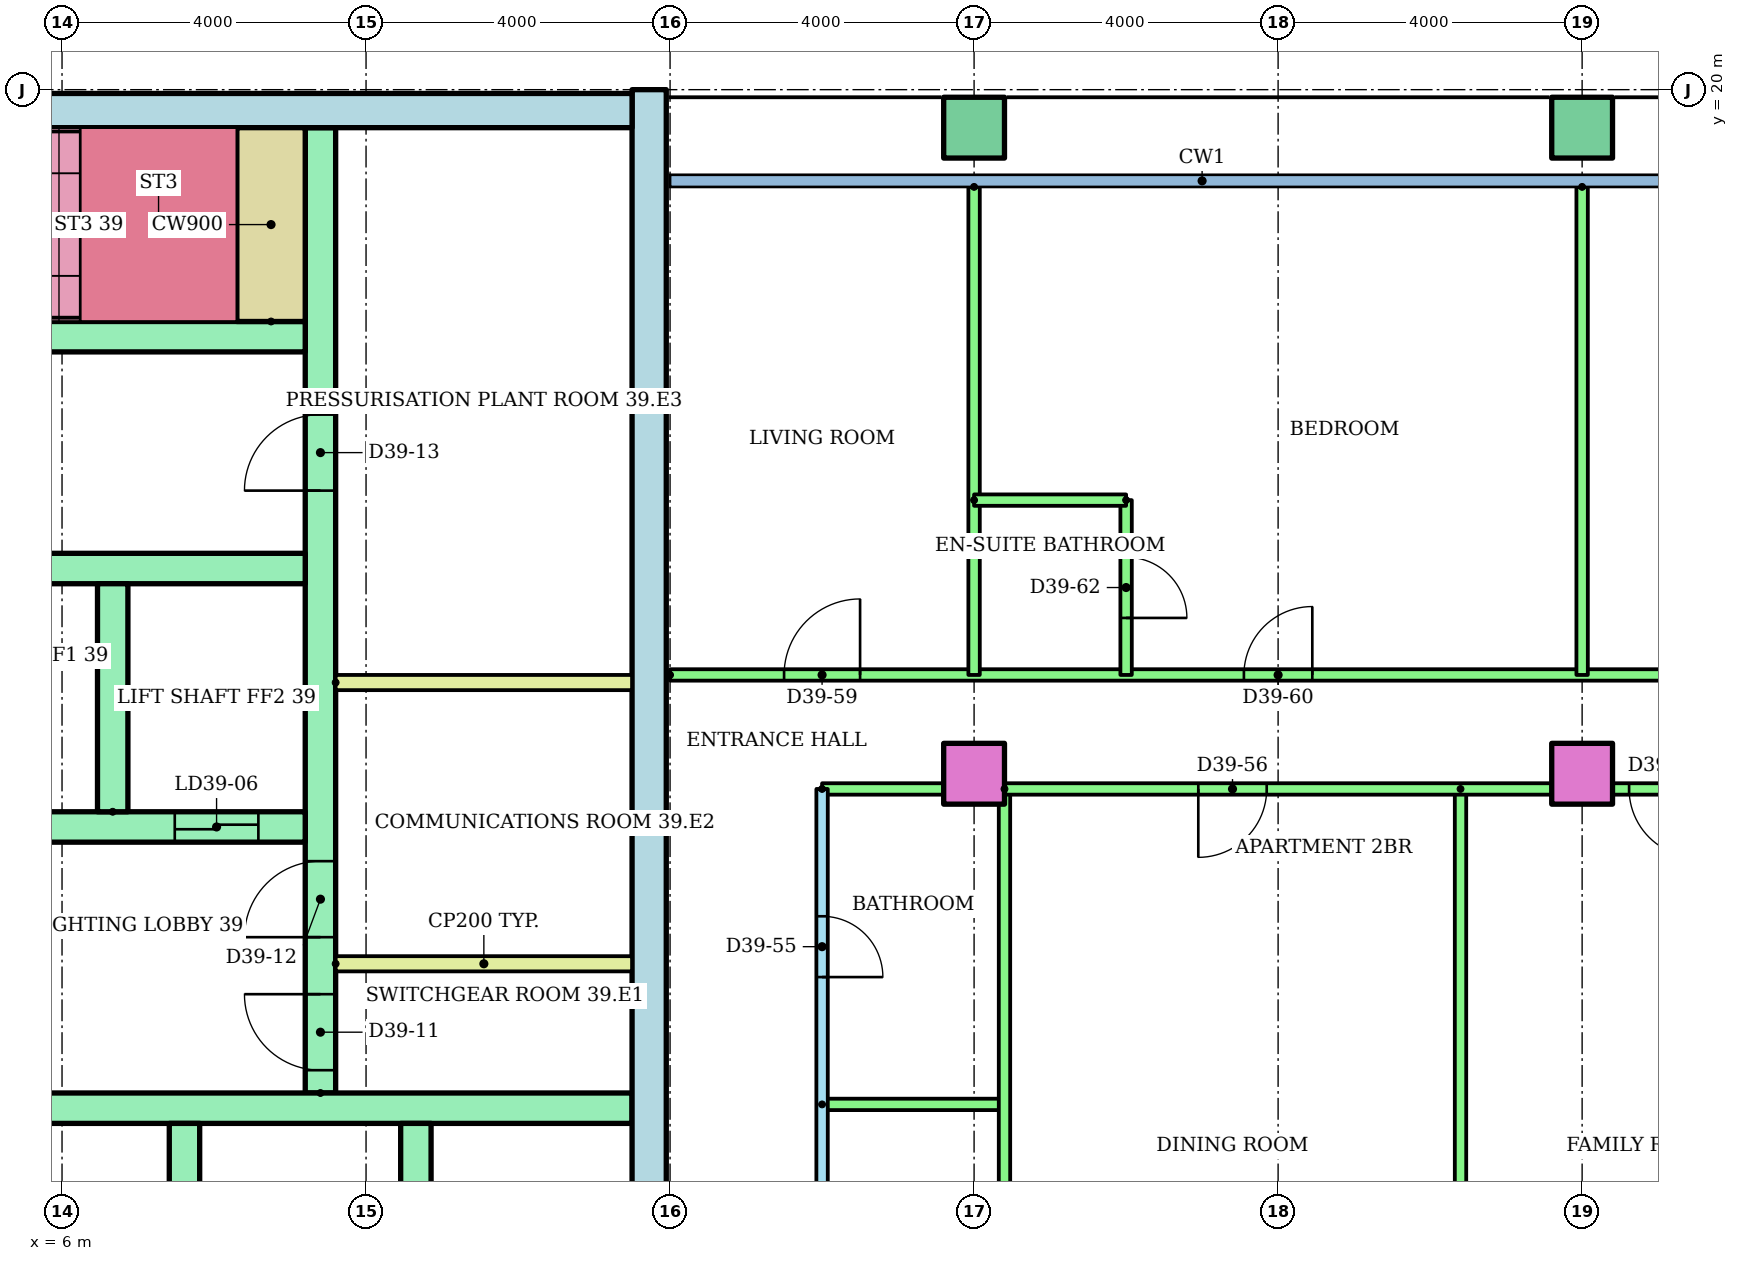
"""IFC4 building model, lengths in metres.
Left out: names, types, materials, properties, quantities, classifications, styles, units other than length and angle.
Written with IfcOpenShell. Run it as: python <this file> out.ifc"""

import sys

from ifc_helpers import new_model, si_unit, direction, frame, frame_2d, origin, origin_2d, place, context, subcontext, project, spatial, rectangle, hollow_rectangle, extrude, element, fill, save


model = new_model("IFC4")
c1 = context("Model", 3, precision=1e-05, world=origin(), true_north=direction((0.0, 1.0)))
c2 = subcontext(c1, "Body", "Model", "MODEL_VIEW")
j1 = project(units=[si_unit("LENGTHUNIT", "METRE"), si_unit("PLANEANGLEUNIT", "RADIAN")], contexts=[c1])
p1 = place(None, origin())
s1 = spatial("IfcSite", under=j1, at=p1, CompositionType="ELEMENT")
p2 = place(p1, origin())
s2 = spatial("IfcBuilding", under=s1, at=p2, CompositionType="ELEMENT")
p3 = place(p2, frame((0.0, 0.0, 148.6)))
s3 = spatial("IfcBuildingStorey", under=s2, at=p3, CompositionType="ELEMENT", Elevation=148.6)
for number, where in (
    (1, (18.0, 11.0, 0.0)),
    (2, (26.0, 11.0, 0.0)),
):
    element("IfcColumn", number, at=place(p3, frame(where)), inside=s3, PredefinedType="COLUMN", context=c2, shape_type="SweptSolid", body=[
        extrude(rectangle(XDim=0.8, YDim=0.8, at=origin_2d()), origin(), (0.0, 0.0, 1.0), 3.2),
    ])
for number, where in (
    (3, (18.0, 19.5, 0.0)),
    (4, (26.0, 19.5, 0.0)),
):
    element("IfcColumn", number, at=place(p3, frame(where)), inside=s3, PredefinedType="COLUMN", context=c2, shape_type="SweptSolid", body=[
        extrude(hollow_rectangle(XDim=0.8, YDim=0.8, WallThickness=0.04, at=origin_2d()), origin(), (0.0, 0.0, 1.0), 3.2),
    ])
p4 = place(p3, frame((13.725, 3.0, 0.0), z_axis=(0.0, 0.0, 1.0), x_axis=(0.0, 1.0, 0.0)))
e5 = element("IfcWall", 5, at=p4, inside=s3, PredefinedType="SHEAR", context=c2, shape_type="SweptSolid", body=[
    extrude(rectangle(XDim=17.0, YDim=0.45, at=frame_2d((8.5, 0.0))), origin(), (0.0, 0.0, 1.0), 2.8),
])
p5 = place(p3, frame((-13.5, 19.725, 0.0)))
e6 = element("IfcWall", 6, at=p5, inside=s3, PredefinedType="SHEAR", context=c2, shape_type="SweptSolid", body=[
    extrude(rectangle(XDim=27.0, YDim=0.45, at=frame_2d((13.5, 0.0))), origin(), (0.0, 0.0, 1.0), 2.8),
])
p6 = place(p3, frame((9.4, 6.8, 0.0), z_axis=(0.0, 0.0, 1.0), x_axis=(0.0, 1.0, 0.0)))
e7 = element("IfcWall", 7, at=p6, inside=s3, PredefinedType="SHEAR", context=c2, shape_type="SweptSolid", body=[
    extrude(rectangle(XDim=12.7, YDim=0.4, at=frame_2d((6.35, 0.0))), origin(), (0.0, 0.0, 1.0), 2.8),
])
p7 = place(p6, frame((0.3, 0.0, 0.0)))
e8 = element("IfcOpeningElement", 8, at=p7, cuts=e7, PredefinedType="OPENING", context=c2, shape_type="SweptSolid", body=[
    extrude(rectangle(XDim=1.0, YDim=2.1, at=frame_2d((0.5, 1.05))), frame((0.0, 0.21, 0.0), z_axis=(0.0, -1.0, 0.0), x_axis=(1.0, 0.0, 0.0)), (0.0, 0.0, 1.0), 0.42),
])
p8 = place(p6, frame((2.05, 0.0, 0.0)))
e9 = element("IfcOpeningElement", 9, at=p8, cuts=e7, PredefinedType="OPENING", context=c2, shape_type="SweptSolid", body=[
    extrude(rectangle(XDim=1.0, YDim=2.1, at=frame_2d((0.5, 1.05))), frame((0.0, 0.21, 0.0), z_axis=(0.0, -1.0, 0.0), x_axis=(1.0, 0.0, 0.0)), (0.0, 0.0, 1.0), 0.42),
])
p9 = place(p6, frame((7.925, 0.0, 0.0)))
e10 = element("IfcOpeningElement", 10, at=p9, cuts=e7, PredefinedType="OPENING", context=c2, shape_type="SweptSolid", body=[
    extrude(rectangle(XDim=1.0, YDim=2.1, at=frame_2d((0.5, 1.05))), frame((0.0, 0.21, 0.0), z_axis=(0.0, -1.0, 0.0), x_axis=(1.0, 0.0, 0.0)), (0.0, 0.0, 1.0), 0.42),
])
p10 = place(p3, frame((1.522, 6.6, 0.0)))
e11 = element("IfcWall", 11, at=p10, inside=s3, PredefinedType="SHEAR", context=c2, shape_type="SweptSolid", body=[
    extrude(rectangle(XDim=11.978, YDim=0.4, at=frame_2d((5.989, 0.0))), origin(), (0.0, 0.0, 1.0), 2.8),
])
for number, where, z_axis, x_axis in (
    (12, (7.611, 3.4, 0.0), (0.0, 0.0, 1.0), (0.0, 1.0, 0.0)),
    (13, (10.656, 3.4, 0.0), (0.0, 0.0, 1.0), (0.0, 1.0, 0.0)),
):
    element("IfcWall", number, at=place(p3, frame(where, z_axis=z_axis, x_axis=x_axis)), inside=s3, PredefinedType="SHEAR", context=c2, shape_type="SweptSolid", body=[
        extrude(rectangle(XDim=3.0, YDim=0.4, at=frame_2d((1.5, 0.0))), origin(), (0.0, 0.0, 1.0), 2.8),
    ])
p11 = place(p3, frame((1.2, 10.3, 0.0)))
e14 = element("IfcWall", 14, at=p11, inside=s3, PredefinedType="SHEAR", context=c2, shape_type="SweptSolid", body=[
    extrude(rectangle(XDim=8.0, YDim=0.4, at=frame_2d((4.0, 0.0))), origin(), (0.0, 0.0, 1.0), 2.8),
])
p12 = place(p11, frame((3.55, 0.0, 0.0)))
e15 = element("IfcOpeningElement", 15, at=p12, cuts=e14, PredefinedType="OPENING", context=c2, shape_type="SweptSolid", body=[
    extrude(rectangle(XDim=1.1, YDim=2.1, at=frame_2d((0.55, 1.05))), frame((0.0, 0.21, 0.0), z_axis=(0.0, -1.0, 0.0), x_axis=(1.0, 0.0, 0.0)), (0.0, 0.0, 1.0), 0.42),
])
p13 = place(p11, frame((6.283, 0.0, 0.0)))
e16 = element("IfcOpeningElement", 16, at=p13, cuts=e14, PredefinedType="OPENING", context=c2, shape_type="SweptSolid", body=[
    extrude(rectangle(XDim=1.1, YDim=2.1, at=frame_2d((0.55, 1.05))), frame((0.0, 0.21, 0.0), z_axis=(0.0, -1.0, 0.0), x_axis=(1.0, 0.0, 0.0)), (0.0, 0.0, 1.0), 0.42),
])
p14 = place(p11, frame((0.867, 0.0, 0.0)))
e17 = element("IfcOpeningElement", 17, at=p14, cuts=e14, PredefinedType="OPENING", context=c2, shape_type="SweptSolid", body=[
    extrude(rectangle(XDim=1.0, YDim=2.1, at=frame_2d((0.5, 1.05))), frame((0.0, 0.21, 0.0), z_axis=(0.0, -1.0, 0.0), x_axis=(1.0, 0.0, 0.0)), (0.0, 0.0, 1.0), 0.42),
])
p15 = place(p3, frame((1.2, 13.7, 0.0)))
e18 = element("IfcWall", 18, at=p15, inside=s3, PredefinedType="SHEAR", context=c2, shape_type="SweptSolid", body=[
    extrude(rectangle(XDim=8.0, YDim=0.4, at=frame_2d((4.0, 0.0))), origin(), (0.0, 0.0, 1.0), 2.8),
])
p16 = place(p3, frame((6.667, 10.5, 0.0), z_axis=(0.0, 0.0, 1.0), x_axis=(0.0, 1.0, 0.0)))
e19 = element("IfcWall", 19, at=p16, inside=s3, PredefinedType="SHEAR", context=c2, shape_type="SweptSolid", body=[
    extrude(rectangle(XDim=3.0, YDim=0.4, at=frame_2d((1.5, 0.0))), origin(), (0.0, 0.0, 1.0), 2.8),
])
p17 = place(p3, frame((-9.2, 16.75, 0.0)))
e20 = element("IfcWall", 20, at=p17, inside=s3, PredefinedType="SHEAR", context=c2, shape_type="SweptSolid", body=[
    extrude(rectangle(XDim=18.4, YDim=0.4, at=frame_2d((9.2, 0.0))), origin(), (0.0, 0.0, 1.0), 2.8),
])
p18 = place(p17, frame((0.1, 0.0, 0.0)))
e21 = element("IfcOpeningElement", 21, at=p18, cuts=e20, PredefinedType="OPENING", context=c2, shape_type="SweptSolid", body=[
    extrude(rectangle(XDim=0.95, YDim=2.1, at=frame_2d((0.475, 1.05))), frame((0.0, 0.21, 0.0), z_axis=(0.0, -1.0, 0.0), x_axis=(1.0, 0.0, 0.0)), (0.0, 0.0, 1.0), 0.42),
])
p19 = place(p17, frame((6.1, 0.0, 0.0)))
e22 = element("IfcOpeningElement", 22, at=p19, cuts=e20, PredefinedType="OPENING", context=c2, shape_type="SweptSolid", body=[
    extrude(rectangle(XDim=0.95, YDim=2.1, at=frame_2d((0.475, 1.05))), frame((0.0, 0.21, 0.0), z_axis=(0.0, -1.0, 0.0), x_axis=(1.0, 0.0, 0.0)), (0.0, 0.0, 1.0), 0.42),
])
p20 = place(p17, frame((12.1, 0.0, 0.0)))
e23 = element("IfcOpeningElement", 23, at=p20, cuts=e20, PredefinedType="OPENING", context=c2, shape_type="SweptSolid", body=[
    extrude(rectangle(XDim=0.95, YDim=2.1, at=frame_2d((0.475, 1.05))), frame((0.0, 0.21, 0.0), z_axis=(0.0, -1.0, 0.0), x_axis=(1.0, 0.0, 0.0)), (0.0, 0.0, 1.0), 0.42),
])
p21 = place(p3, frame((8.75, 16.95, 0.0), z_axis=(0.0, 0.0, 1.0), x_axis=(0.0, 1.0, 0.0)))
e24 = element("IfcWall", 24, at=p21, inside=s3, PredefinedType="SHEAR", context=c2, shape_type="SweptSolid", body=[
    extrude(rectangle(XDim=2.55, YDim=0.9, at=frame_2d((1.275, 0.0))), origin(), (0.0, 0.0, 1.0), 2.8),
])
for number, where in (
    (25, (9.6, 8.5, 0.0)),
    (26, (9.6, 12.2, 0.0)),
):
    element("IfcWall", number, at=place(p3, frame(where)), inside=s3, PredefinedType="PARTITIONING", context=c2, shape_type="SweptSolid", body=[
        extrude(rectangle(XDim=3.9, YDim=0.2, at=frame_2d((1.95, 0.0))), origin(), (0.0, 0.0, 1.0), 2.8),
    ])
p22 = place(p3, frame((16.0, 10.8, 0.0), z_axis=(0.0, 0.0, 1.0), x_axis=(0.0, -1.0, 0.0)))
e27 = element("IfcWall", 27, at=p22, inside=s3, PredefinedType="PARTITIONING", context=c2, shape_type="SweptSolid", body=[
    extrude(rectangle(XDim=9.4, YDim=0.15, at=frame_2d((4.7, 0.0))), origin(), (0.0, 0.0, 1.0), 2.4),
])
p23 = place(p22, frame((6.325, 0.0, 0.0)))
e28 = element("IfcOpeningElement", 28, at=p23, cuts=e27, PredefinedType="OPENING", context=c2, shape_type="SweptSolid", body=[
    extrude(rectangle(XDim=0.9, YDim=2.1, at=frame_2d((0.45, 1.05))), frame((0.0, 0.085, 0.0), z_axis=(0.0, -1.0, 0.0), x_axis=(1.0, 0.0, 0.0)), (0.0, 0.0, 1.0), 0.17),
])
p24 = place(p22, frame((1.675, 0.0, 0.0)))
e29 = element("IfcOpeningElement", 29, at=p24, cuts=e27, PredefinedType="OPENING", context=c2, shape_type="SweptSolid", body=[
    extrude(rectangle(XDim=0.8, YDim=2.1, at=frame_2d((0.4, 1.05))), frame((0.0, 0.085, 0.0), z_axis=(0.0, -1.0, 0.0), x_axis=(1.0, 0.0, 0.0)), (0.0, 0.0, 1.0), 0.17),
])
p25 = place(p3, frame((16.0, 6.65, 0.0)))
e30 = element("IfcWall", 30, at=p25, inside=s3, PredefinedType="PARTITIONING", context=c2, shape_type="SweptSolid", body=[
    extrude(rectangle(XDim=2.4, YDim=0.15, at=frame_2d((1.2, 0.0))), origin(), (0.0, 0.0, 1.0), 2.4),
])
for number, where, z_axis, x_axis in (
    (31, (18.4, 10.8, 0.0), (0.0, 0.0, 1.0), (0.0, -1.0, 0.0)),
    (32, (24.4, 10.8, 0.0), (0.0, 0.0, 1.0), (0.0, -1.0, 0.0)),
):
    element("IfcWall", number, at=place(p3, frame(where, z_axis=z_axis, x_axis=x_axis)), inside=s3, PredefinedType="PARTITIONING", context=c2, shape_type="SweptSolid", body=[
        extrude(rectangle(XDim=9.4, YDim=0.15, at=frame_2d((4.7, 0.0))), origin(), (0.0, 0.0, 1.0), 2.4),
    ])
p26 = place(p3, frame((32.71, 10.8, 0.0), z_axis=(0.0, 0.0, 1.0), x_axis=(-1.0, 0.0, 0.0)))
e33 = element("IfcWall", 33, at=p26, inside=s3, PredefinedType="PARTITIONING", context=c2, shape_type="SweptSolid", body=[
    extrude(rectangle(XDim=16.71, YDim=0.15, at=frame_2d((8.355, 0.0))), origin(), (0.0, 0.0, 1.0), 2.4),
])
p27 = place(p26, frame((10.86, 0.0, 0.0)))
e34 = element("IfcOpeningElement", 34, at=p27, cuts=e33, PredefinedType="OPENING", context=c2, shape_type="SweptSolid", body=[
    extrude(rectangle(XDim=0.9, YDim=2.1, at=frame_2d((0.45, 1.05))), frame((0.0, 0.085, 0.0), z_axis=(0.0, -1.0, 0.0), x_axis=(1.0, 0.0, 0.0)), (0.0, 0.0, 1.0), 0.17),
])
p28 = place(p26, frame((5.192, 0.0, 0.0)))
e35 = element("IfcOpeningElement", 35, at=p28, cuts=e33, PredefinedType="OPENING", context=c2, shape_type="SweptSolid", body=[
    extrude(rectangle(XDim=0.9, YDim=2.1, at=frame_2d((0.45, 1.05))), frame((0.0, 0.085, 0.0), z_axis=(0.0, -1.0, 0.0), x_axis=(1.0, 0.0, 0.0)), (0.0, 0.0, 1.0), 0.17),
])
p29 = place(p26, frame((1.435, 0.0, 0.0)))
e36 = element("IfcOpeningElement", 36, at=p29, cuts=e33, PredefinedType="OPENING", context=c2, shape_type="SweptSolid", body=[
    extrude(rectangle(XDim=0.9, YDim=2.1, at=frame_2d((0.45, 1.05))), frame((0.0, 0.085, 0.0), z_axis=(0.0, -1.0, 0.0), x_axis=(1.0, 0.0, 0.0)), (0.0, 0.0, 1.0), 0.17),
])
p30 = place(p3, frame((14.0, 12.3, 0.0)))
e37 = element("IfcWall", 37, at=p30, inside=s3, PredefinedType="PARTITIONING", context=c2, shape_type="SweptSolid", body=[
    extrude(rectangle(XDim=18.72, YDim=0.15, at=frame_2d((9.36, 0.0))), origin(), (0.0, 0.0, 1.0), 2.4),
])
p31 = place(p30, frame((1.5, 0.0, 0.0)))
e38 = element("IfcOpeningElement", 38, at=p31, cuts=e37, PredefinedType="OPENING", context=c2, shape_type="SweptSolid", body=[
    extrude(rectangle(XDim=1.0, YDim=2.1, at=frame_2d((0.5, 1.05))), frame((0.0, 0.085, 0.0), z_axis=(0.0, -1.0, 0.0), x_axis=(1.0, 0.0, 0.0)), (0.0, 0.0, 1.0), 0.17),
])
p32 = place(p30, frame((7.55, 0.0, 0.0)))
e39 = element("IfcOpeningElement", 39, at=p32, cuts=e37, PredefinedType="OPENING", context=c2, shape_type="SweptSolid", body=[
    extrude(rectangle(XDim=0.9, YDim=2.1, at=frame_2d((0.45, 1.05))), frame((0.0, 0.085, 0.0), z_axis=(0.0, -1.0, 0.0), x_axis=(1.0, 0.0, 0.0)), (0.0, 0.0, 1.0), 0.17),
])
p33 = place(p30, frame((14.8, 0.0, 0.0)))
e40 = element("IfcOpeningElement", 40, at=p33, cuts=e37, PredefinedType="OPENING", context=c2, shape_type="SweptSolid", body=[
    extrude(rectangle(XDim=0.9, YDim=2.1, at=frame_2d((0.45, 1.05))), frame((0.0, 0.085, 0.0), z_axis=(0.0, -1.0, 0.0), x_axis=(1.0, 0.0, 0.0)), (0.0, 0.0, 1.0), 0.17),
])
for number, where, z_axis, x_axis in (
    (41, (18.0, 18.721, 0.0), (0.0, 0.0, 1.0), (0.0, -1.0, 0.0)),
    (42, (26.0, 18.721, 0.0), (0.0, 0.0, 1.0), (0.0, -1.0, 0.0)),
):
    element("IfcWall", number, at=place(p3, frame(where, z_axis=z_axis, x_axis=x_axis)), inside=s3, PredefinedType="PARTITIONING", context=c2, shape_type="SweptSolid", body=[
        extrude(rectangle(XDim=6.421, YDim=0.15, at=frame_2d((3.21, 0.0))), origin(), (0.0, 0.0, 1.0), 2.4),
    ])
p34 = place(p3, frame((20.0, 14.6, 0.0), z_axis=(0.0, 0.0, 1.0), x_axis=(0.0, -1.0, 0.0)))
e43 = element("IfcWall", 43, at=p34, inside=s3, PredefinedType="PARTITIONING", context=c2, shape_type="SweptSolid", body=[
    extrude(rectangle(XDim=2.3, YDim=0.15, at=frame_2d((1.15, 0.0))), origin(), (0.0, 0.0, 1.0), 2.4),
])
p35 = place(p34, frame((0.75, 0.0, 0.0)))
e44 = element("IfcOpeningElement", 44, at=p35, cuts=e43, PredefinedType="OPENING", context=c2, shape_type="SweptSolid", body=[
    extrude(rectangle(XDim=0.8, YDim=2.1, at=frame_2d((0.4, 1.05))), frame((0.0, 0.085, 0.0), z_axis=(0.0, -1.0, 0.0), x_axis=(1.0, 0.0, 0.0)), (0.0, 0.0, 1.0), 0.17),
])
p36 = place(p3, frame((18.0, 14.6, 0.0)))
e45 = element("IfcWall", 45, at=p36, inside=s3, PredefinedType="PARTITIONING", context=c2, shape_type="SweptSolid", body=[
    extrude(rectangle(XDim=2.0, YDim=0.15, at=frame_2d((1.0, 0.0))), origin(), (0.0, 0.0, 1.0), 2.4),
])
p37 = place(p13, origin())
e46 = element("IfcDoor", 46, at=p37, inside=s3, OperationType="SLIDING_TO_LEFT", PredefinedType="DOOR", context=c2, shape_type="SweptSolid", body=[
    extrude(rectangle(XDim=1.1, YDim=2.1, at=frame_2d((0.55, 1.05))), frame((0.0, 0.025, 0.0), z_axis=(0.0, -1.0, 0.0), x_axis=(1.0, 0.0, 0.0)), (0.0, 0.0, 1.0), 0.05),
])
fill(e16, e46)
p38 = place(p7, origin())
e47 = element("IfcDoor", 47, at=p38, inside=s3, OperationType="SINGLE_SWING_RIGHT", PredefinedType="DOOR", context=c2, shape_type="SweptSolid", body=[
    extrude(rectangle(XDim=1.0, YDim=2.1, at=frame_2d((0.5, 1.05))), frame((0.0, 0.025, 0.0), z_axis=(0.0, -1.0, 0.0), x_axis=(1.0, 0.0, 0.0)), (0.0, 0.0, 1.0), 0.05),
])
fill(e8, e47)
p39 = place(p8, origin())
e48 = element("IfcDoor", 48, at=p39, inside=s3, OperationType="SINGLE_SWING_LEFT", PredefinedType="DOOR", context=c2, shape_type="SweptSolid", body=[
    extrude(rectangle(XDim=1.0, YDim=2.1, at=frame_2d((0.5, 1.05))), frame((0.0, 0.025, 0.0), z_axis=(0.0, -1.0, 0.0), x_axis=(1.0, 0.0, 0.0)), (0.0, 0.0, 1.0), 0.05),
])
fill(e9, e48)
p40 = place(p9, origin())
e49 = element("IfcDoor", 49, at=p40, inside=s3, OperationType="SINGLE_SWING_LEFT", PredefinedType="DOOR", context=c2, shape_type="SweptSolid", body=[
    extrude(rectangle(XDim=1.0, YDim=2.1, at=frame_2d((0.5, 1.05))), frame((0.0, 0.025, 0.0), z_axis=(0.0, -1.0, 0.0), x_axis=(1.0, 0.0, 0.0)), (0.0, 0.0, 1.0), 0.05),
])
fill(e10, e49)
p41 = place(p24, origin())
e50 = element("IfcDoor", 50, at=p41, inside=s3, OperationType="SINGLE_SWING_RIGHT", PredefinedType="DOOR", context=c2, shape_type="SweptSolid", body=[
    extrude(rectangle(XDim=0.8, YDim=2.1, at=frame_2d((0.4, 1.05))), frame((0.0, 0.025, 0.0), z_axis=(0.0, -1.0, 0.0), x_axis=(1.0, 0.0, 0.0)), (0.0, 0.0, 1.0), 0.05),
])
fill(e29, e50)
p42 = place(p27, origin())
e51 = element("IfcDoor", 51, at=p42, inside=s3, OperationType="SINGLE_SWING_RIGHT", PredefinedType="DOOR", context=c2, shape_type="SweptSolid", body=[
    extrude(rectangle(XDim=0.9, YDim=2.1, at=frame_2d((0.45, 1.05))), frame((0.0, 0.025, 0.0), z_axis=(0.0, -1.0, 0.0), x_axis=(1.0, 0.0, 0.0)), (0.0, 0.0, 1.0), 0.05),
])
fill(e34, e51)
p43 = place(p28, origin())
e52 = element("IfcDoor", 52, at=p43, inside=s3, OperationType="SINGLE_SWING_LEFT", PredefinedType="DOOR", context=c2, shape_type="SweptSolid", body=[
    extrude(rectangle(XDim=0.9, YDim=2.1, at=frame_2d((0.45, 1.05))), frame((0.0, 0.025, 0.0), z_axis=(0.0, -1.0, 0.0), x_axis=(1.0, 0.0, 0.0)), (0.0, 0.0, 1.0), 0.05),
])
fill(e35, e52)
p44 = place(p31, origin())
e53 = element("IfcDoor", 53, at=p44, inside=s3, OperationType="SINGLE_SWING_RIGHT", PredefinedType="DOOR", context=c2, shape_type="SweptSolid", body=[
    extrude(rectangle(XDim=1.0, YDim=2.1, at=frame_2d((0.5, 1.05))), frame((0.0, 0.025, 0.0), z_axis=(0.0, -1.0, 0.0), x_axis=(1.0, 0.0, 0.0)), (0.0, 0.0, 1.0), 0.05),
])
fill(e38, e53)
p45 = place(p32, origin())
e54 = element("IfcDoor", 54, at=p45, inside=s3, OperationType="SINGLE_SWING_RIGHT", PredefinedType="DOOR", context=c2, shape_type="SweptSolid", body=[
    extrude(rectangle(XDim=0.9, YDim=2.1, at=frame_2d((0.45, 1.05))), frame((0.0, 0.025, 0.0), z_axis=(0.0, -1.0, 0.0), x_axis=(1.0, 0.0, 0.0)), (0.0, 0.0, 1.0), 0.05),
])
fill(e39, e54)
p46 = place(p35, origin())
e55 = element("IfcDoor", 55, at=p46, inside=s3, OperationType="SINGLE_SWING_RIGHT", PredefinedType="DOOR", context=c2, shape_type="SweptSolid", body=[
    extrude(rectangle(XDim=0.8, YDim=2.1, at=frame_2d((0.4, 1.05))), frame((0.0, 0.025, 0.0), z_axis=(0.0, -1.0, 0.0), x_axis=(1.0, 0.0, 0.0)), (0.0, 0.0, 1.0), 0.05),
])
fill(e44, e55)
save(model, sys.argv[1])
